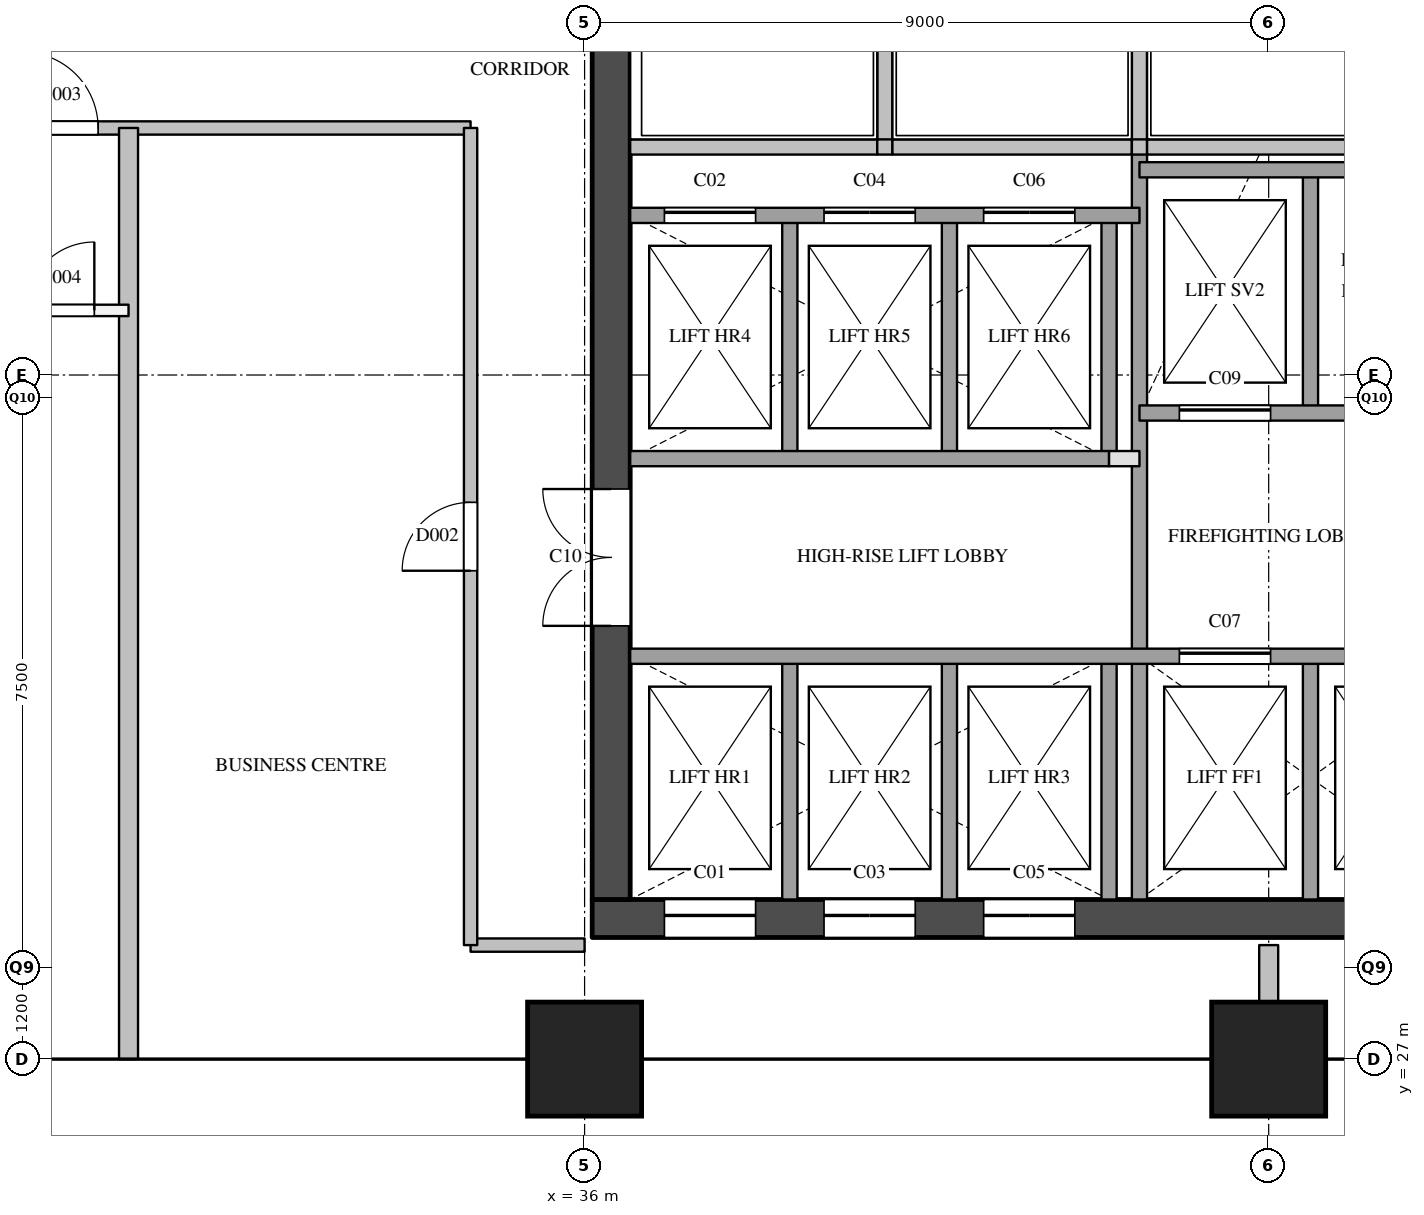
"""IFC4 building model, lengths in metres.
Left out: names, types, materials, properties, quantities, classifications, styles, units other than length and angle.
Written with IfcOpenShell. Run it as: python <this file> out.ifc"""

import sys

from ifc_helpers import new_model, si_unit, direction, frame, frame_2d, origin, origin_2d, place, context, subcontext, project, spatial, rectangle, extrude, element, fill, save


model = new_model("IFC4")
c1 = context("Model", 3, precision=1e-05, world=origin(), true_north=direction((0.0, 1.0)))
c2 = subcontext(c1, "Body", "Model", "MODEL_VIEW")
j1 = project(units=[si_unit("LENGTHUNIT", "METRE"), si_unit("PLANEANGLEUNIT", "RADIAN")], contexts=[c1])
p1 = place(None, origin())
s1 = spatial("IfcSite", under=j1, at=p1, CompositionType="ELEMENT")
p2 = place(p1, origin())
s2 = spatial("IfcBuilding", under=s1, at=p2, CompositionType="ELEMENT")
p3 = place(p2, frame((0.0, 0.0, 134.9)))
s3 = spatial("IfcBuildingStorey", under=s2, at=p3, CompositionType="ELEMENT", Elevation=134.9)
for number, where, z_axis, x_axis in (
    (1, (36.0, 27.0, 0.0), (0.0, 0.0, 1.0), (1.0, 0.0, 0.0)),
    (2, (45.0, 27.0, 0.0), (0.0, 0.0, 1.0), (1.0, 0.0, 0.0)),
):
    element("IfcColumn", number, at=place(p3, frame(where, z_axis=z_axis, x_axis=x_axis)), inside=s3, PredefinedType="COLUMN", context=c2, shape_type="SweptSolid", body=[
        extrude(rectangle(XDim=1.5, YDim=1.5, at=origin_2d()), origin(), (0.0, 0.0, 1.0), 3.9),
    ])
p4 = place(p3, frame((36.1, 28.85, 0.0), z_axis=(0.0, 0.0, 1.0), x_axis=(1.0, 0.0, 0.0)))
e3 = element("IfcWall", 3, at=p4, inside=s3, PredefinedType="SHEAR", context=c2, shape_type="SweptSolid", body=[
    extrude(rectangle(XDim=12.2, YDim=0.5, at=frame_2d((6.1, 0.0))), origin(), (0.0, 0.0, 1.0), 3.6),
])
p5 = place(p4, frame((0.95, 0.0, 0.0)))
e4 = element("IfcOpeningElement", 4, at=p5, cuts=e3, PredefinedType="OPENING", context=c2, shape_type="SweptSolid", body=[
    extrude(rectangle(XDim=1.2, YDim=2.1, at=frame_2d((0.6, 1.05))), frame((0.0, 0.26, 0.0), z_axis=(0.0, -1.0, 0.0), x_axis=(1.0, 0.0, 0.0)), (0.0, 0.0, 1.0), 0.52),
])
p6 = place(p4, frame((3.05, 0.0, 0.0)))
e5 = element("IfcOpeningElement", 5, at=p6, cuts=e3, PredefinedType="OPENING", context=c2, shape_type="SweptSolid", body=[
    extrude(rectangle(XDim=1.2, YDim=2.1, at=frame_2d((0.6, 1.05))), frame((0.0, 0.26, 0.0), z_axis=(0.0, -1.0, 0.0), x_axis=(1.0, 0.0, 0.0)), (0.0, 0.0, 1.0), 0.52),
])
p7 = place(p4, frame((5.15, 0.0, 0.0)))
e6 = element("IfcOpeningElement", 6, at=p7, cuts=e3, PredefinedType="OPENING", context=c2, shape_type="SweptSolid", body=[
    extrude(rectangle(XDim=1.2, YDim=2.1, at=frame_2d((0.6, 1.05))), frame((0.0, 0.26, 0.0), z_axis=(0.0, -1.0, 0.0), x_axis=(1.0, 0.0, 0.0)), (0.0, 0.0, 1.0), 0.52),
])
p8 = place(p3, frame((36.35, 29.1, 0.0), z_axis=(0.0, 0.0, 1.0), x_axis=(0.0, 1.0, 0.0)))
e7 = element("IfcWall", 7, at=p8, inside=s3, PredefinedType="SHEAR", context=c2, shape_type="SweptSolid", body=[
    extrude(rectangle(XDim=20.3, YDim=0.5, at=frame_2d((10.15, 0.0))), origin(), (0.0, 0.0, 1.0), 3.6),
])
p9 = place(p8, frame((3.6, 0.0, 0.0)))
e8 = element("IfcOpeningElement", 8, at=p9, cuts=e7, PredefinedType="OPENING", context=c2, shape_type="SweptSolid", body=[
    extrude(rectangle(XDim=1.8, YDim=2.1, at=frame_2d((0.9, 1.05))), frame((0.0, 0.26, 0.0), z_axis=(0.0, -1.0, 0.0), x_axis=(1.0, 0.0, 0.0)), (0.0, 0.0, 1.0), 0.52),
])
p10 = place(p8, frame((16.4, 0.0, 0.0)))
e9 = element("IfcOpeningElement", 9, at=p10, cuts=e7, PredefinedType="OPENING", context=c2, shape_type="SweptSolid", body=[
    extrude(rectangle(XDim=1.0, YDim=2.1, at=frame_2d((0.5, 1.05))), frame((0.0, 0.26, 0.0), z_axis=(0.0, -1.0, 0.0), x_axis=(1.0, 0.0, 0.0)), (0.0, 0.0, 1.0), 0.52),
])
p11 = place(p3, frame((38.7, 29.1, 0.0), z_axis=(0.0, 0.0, 1.0), x_axis=(0.0, 1.0, 0.0)))
e10 = element("IfcWall", 10, at=p11, inside=s3, PredefinedType="SOLIDWALL", context=c2, shape_type="SweptSolid", body=[
    extrude(rectangle(XDim=3.2, YDim=0.2, at=frame_2d((1.6, 0.0))), origin(), (0.0, 0.0, 1.0), 3.6),
])
p12 = place(p3, frame((38.7, 34.9, 0.0), z_axis=(0.0, 0.0, 1.0), x_axis=(0.0, 1.0, 0.0)))
e11 = element("IfcWall", 11, at=p12, inside=s3, PredefinedType="SOLIDWALL", context=c2, shape_type="SweptSolid", body=[
    extrude(rectangle(XDim=3.2, YDim=0.2, at=frame_2d((1.6, 0.0))), origin(), (0.0, 0.0, 1.0), 3.6),
])
p13 = place(p3, frame((39.95, 39.0, 0.0), z_axis=(0.0, 0.0, 1.0), x_axis=(0.0, 1.0, 0.0)))
e12 = element("IfcWall", 12, at=p13, inside=s3, PredefinedType="SOLIDWALL", context=c2, shape_type="SweptSolid", body=[
    extrude(rectangle(XDim=1.78, YDim=0.2, at=frame_2d((0.89, 0.0))), origin(), (0.0, 0.0, 1.0), 3.6),
])
p14 = place(p3, frame((40.8, 29.1, 0.0), z_axis=(0.0, 0.0, 1.0), x_axis=(0.0, 1.0, 0.0)))
e13 = element("IfcWall", 13, at=p14, inside=s3, PredefinedType="SOLIDWALL", context=c2, shape_type="SweptSolid", body=[
    extrude(rectangle(XDim=3.2, YDim=0.2, at=frame_2d((1.6, 0.0))), origin(), (0.0, 0.0, 1.0), 3.6),
])
p15 = place(p3, frame((40.8, 34.9, 0.0), z_axis=(0.0, 0.0, 1.0), x_axis=(0.0, 1.0, 0.0)))
e14 = element("IfcWall", 14, at=p15, inside=s3, PredefinedType="SOLIDWALL", context=c2, shape_type="SweptSolid", body=[
    extrude(rectangle(XDim=3.2, YDim=0.2, at=frame_2d((1.6, 0.0))), origin(), (0.0, 0.0, 1.0), 3.6),
])
p16 = place(p3, frame((42.9, 29.1, 0.0), z_axis=(0.0, 0.0, 1.0), x_axis=(0.0, 1.0, 0.0)))
e15 = element("IfcWall", 15, at=p16, inside=s3, PredefinedType="SOLIDWALL", context=c2, shape_type="SweptSolid", body=[
    extrude(rectangle(XDim=3.2, YDim=0.2, at=frame_2d((1.6, 0.0))), origin(), (0.0, 0.0, 1.0), 3.6),
])
p17 = place(p3, frame((42.9, 34.9, 0.0), z_axis=(0.0, 0.0, 1.0), x_axis=(0.0, 1.0, 0.0)))
e16 = element("IfcWall", 16, at=p17, inside=s3, PredefinedType="SOLIDWALL", context=c2, shape_type="SweptSolid", body=[
    extrude(rectangle(XDim=3.2, YDim=0.2, at=frame_2d((1.6, 0.0))), origin(), (0.0, 0.0, 1.0), 3.6),
])
p18 = place(p3, frame((43.3, 29.1, 0.0), z_axis=(0.0, 0.0, 1.0), x_axis=(0.0, 1.0, 0.0)))
e17 = element("IfcWall", 17, at=p18, inside=s3, PredefinedType="SOLIDWALL", context=c2, shape_type="SweptSolid", body=[
    extrude(rectangle(XDim=9.9, YDim=0.2, at=frame_2d((4.95, 0.0))), origin(), (0.0, 0.0, 1.0), 3.6),
])
p19 = place(p3, frame((43.3, 39.0, 0.0), z_axis=(0.0, 0.0, 1.0), x_axis=(0.0, 1.0, 0.0)))
e18 = element("IfcWall", 18, at=p19, inside=s3, PredefinedType="SOLIDWALL", context=c2, shape_type="SweptSolid", body=[
    extrude(rectangle(XDim=1.78, YDim=0.2, at=frame_2d((0.89, 0.0))), origin(), (0.0, 0.0, 1.0), 3.6),
])
for number, where, z_axis, x_axis in (
    (19, (45.55, 29.1, 0.0), (0.0, 0.0, 1.0), (0.0, 1.0, 0.0)),
    (20, (45.55, 35.5, 0.0), (0.0, 0.0, 1.0), (0.0, 1.0, 0.0)),
):
    element("IfcWall", number, at=place(p3, frame(where, z_axis=z_axis, x_axis=x_axis)), inside=s3, PredefinedType="SOLIDWALL", context=c2, shape_type="SweptSolid", body=[
        extrude(rectangle(XDim=3.2, YDim=0.2, at=frame_2d((1.6, 0.0))), origin(), (0.0, 0.0, 1.0), 3.6),
    ])
p20 = place(p3, frame((36.6, 32.3, 0.0), z_axis=(0.0, 0.0, 1.0), x_axis=(1.0, 0.0, 0.0)))
e21 = element("IfcWall", 21, at=p20, inside=s3, PredefinedType="SOLIDWALL", context=c2, shape_type="SweptSolid", body=[
    extrude(rectangle(XDim=11.2, YDim=0.2, at=frame_2d((5.6, 0.0))), origin(), (0.0, 0.0, 1.0), 3.6),
])
p21 = place(p20, frame((7.225, 0.0, 0.0)))
e22 = element("IfcOpeningElement", 22, at=p21, cuts=e21, PredefinedType="OPENING", context=c2, shape_type="SweptSolid", body=[
    extrude(rectangle(XDim=1.2, YDim=2.1, at=frame_2d((0.6, 1.05))), frame((0.0, 0.11, 0.0), z_axis=(0.0, -1.0, 0.0), x_axis=(1.0, 0.0, 0.0)), (0.0, 0.0, 1.0), 0.22),
])
p22 = place(p20, frame((9.475, 0.0, 0.0)))
e23 = element("IfcOpeningElement", 23, at=p22, cuts=e21, PredefinedType="OPENING", context=c2, shape_type="SweptSolid", body=[
    extrude(rectangle(XDim=1.2, YDim=2.1, at=frame_2d((0.6, 1.05))), frame((0.0, 0.11, 0.0), z_axis=(0.0, -1.0, 0.0), x_axis=(1.0, 0.0, 0.0)), (0.0, 0.0, 1.0), 0.22),
])
p23 = place(p3, frame((42.9, 34.9, 0.0), z_axis=(0.0, 0.0, 1.0), x_axis=(1.0, 0.0, 0.0)))
e24 = element("IfcWall", 24, at=p23, inside=s3, PredefinedType="PARTITIONING", context=c2, shape_type="SweptSolid", body=[
    extrude(rectangle(XDim=0.4, YDim=0.2, at=frame_2d((0.2, 0.0))), origin(), (0.0, 0.0, 1.0), 3.6),
])
p24 = place(p3, frame((36.6, 34.9, 0.0), z_axis=(0.0, 0.0, 1.0), x_axis=(1.0, 0.0, 0.0)))
e25 = element("IfcWall", 25, at=p24, inside=s3, PredefinedType="SOLIDWALL", context=c2, shape_type="SweptSolid", body=[
    extrude(rectangle(XDim=6.3, YDim=0.2, at=frame_2d((3.15, 0.0))), origin(), (0.0, 0.0, 1.0), 3.6),
])
p25 = place(p3, frame((43.3, 35.5, 0.0), z_axis=(0.0, 0.0, 1.0), x_axis=(1.0, 0.0, 0.0)))
e26 = element("IfcWall", 26, at=p25, inside=s3, PredefinedType="SOLIDWALL", context=c2, shape_type="SweptSolid", body=[
    extrude(rectangle(XDim=4.5, YDim=0.2, at=frame_2d((2.25, 0.0))), origin(), (0.0, 0.0, 1.0), 3.6),
])
p26 = place(p25, frame((0.525, 0.0, 0.0)))
e27 = element("IfcOpeningElement", 27, at=p26, cuts=e26, PredefinedType="OPENING", context=c2, shape_type="SweptSolid", body=[
    extrude(rectangle(XDim=1.2, YDim=2.1, at=frame_2d((0.6, 1.05))), frame((0.0, 0.11, 0.0), z_axis=(0.0, -1.0, 0.0), x_axis=(1.0, 0.0, 0.0)), (0.0, 0.0, 1.0), 0.22),
])
p27 = place(p25, frame((3.025, 0.0, 0.0)))
e28 = element("IfcOpeningElement", 28, at=p27, cuts=e26, PredefinedType="OPENING", context=c2, shape_type="SweptSolid", body=[
    extrude(rectangle(XDim=0.7, YDim=2.1, at=frame_2d((0.35, 1.05))), frame((0.0, 0.11, 0.0), z_axis=(0.0, -1.0, 0.0), x_axis=(1.0, 0.0, 0.0)), (0.0, 0.0, 1.0), 0.22),
])
p28 = place(p3, frame((36.6, 38.1, 0.0), z_axis=(0.0, 0.0, 1.0), x_axis=(1.0, 0.0, 0.0)))
e29 = element("IfcWall", 29, at=p28, inside=s3, PredefinedType="SOLIDWALL", context=c2, shape_type="SweptSolid", body=[
    extrude(rectangle(XDim=6.7, YDim=0.2, at=frame_2d((3.35, 0.0))), origin(), (0.0, 0.0, 1.0), 3.6),
])
p29 = place(p28, frame((0.45, 0.0, 0.0)))
e30 = element("IfcOpeningElement", 30, at=p29, cuts=e29, PredefinedType="OPENING", context=c2, shape_type="SweptSolid", body=[
    extrude(rectangle(XDim=1.2, YDim=2.1, at=frame_2d((0.6, 1.05))), frame((0.0, 0.11, 0.0), z_axis=(0.0, -1.0, 0.0), x_axis=(1.0, 0.0, 0.0)), (0.0, 0.0, 1.0), 0.22),
])
p30 = place(p28, frame((2.55, 0.0, 0.0)))
e31 = element("IfcOpeningElement", 31, at=p30, cuts=e29, PredefinedType="OPENING", context=c2, shape_type="SweptSolid", body=[
    extrude(rectangle(XDim=1.2, YDim=2.1, at=frame_2d((0.6, 1.05))), frame((0.0, 0.11, 0.0), z_axis=(0.0, -1.0, 0.0), x_axis=(1.0, 0.0, 0.0)), (0.0, 0.0, 1.0), 0.22),
])
p31 = place(p28, frame((4.65, 0.0, 0.0)))
e32 = element("IfcOpeningElement", 32, at=p31, cuts=e29, PredefinedType="OPENING", context=c2, shape_type="SweptSolid", body=[
    extrude(rectangle(XDim=1.2, YDim=2.1, at=frame_2d((0.6, 1.05))), frame((0.0, 0.11, 0.0), z_axis=(0.0, -1.0, 0.0), x_axis=(1.0, 0.0, 0.0)), (0.0, 0.0, 1.0), 0.22),
])
p32 = place(p3, frame((43.3, 38.7, 0.0), z_axis=(0.0, 0.0, 1.0), x_axis=(1.0, 0.0, 0.0)))
e33 = element("IfcWall", 33, at=p32, inside=s3, PredefinedType="SOLIDWALL", context=c2, shape_type="SweptSolid", body=[
    extrude(rectangle(XDim=4.5, YDim=0.2, at=frame_2d((2.25, 0.0))), origin(), (0.0, 0.0, 1.0), 3.6),
])
p33 = place(p3, frame((36.6, 39.0, 0.0), z_axis=(0.0, 0.0, 1.0), x_axis=(1.0, 0.0, 0.0)))
e34 = element("IfcWall", 34, at=p33, inside=s3, PredefinedType="SOLIDWALL", context=c2, shape_type="SweptSolid", body=[
    extrude(rectangle(XDim=3.25, YDim=0.2, at=frame_2d((1.625, 0.0))), origin(), (0.0, 0.0, 1.0), 3.6),
])
p34 = place(p3, frame((39.85, 39.0, 0.0), z_axis=(0.0, 0.0, 1.0), x_axis=(1.0, 0.0, 0.0)))
e35 = element("IfcWall", 35, at=p34, inside=s3, PredefinedType="SOLIDWALL", context=c2, shape_type="SweptSolid", body=[
    extrude(rectangle(XDim=0.2, YDim=0.2, at=frame_2d((0.1, 0.0))), origin(), (0.0, 0.0, 1.0), 3.6),
])
p35 = place(p3, frame((40.05, 39.0, 0.0), z_axis=(0.0, 0.0, 1.0), x_axis=(1.0, 0.0, 0.0)))
e36 = element("IfcWall", 36, at=p35, inside=s3, PredefinedType="SOLIDWALL", context=c2, shape_type="SweptSolid", body=[
    extrude(rectangle(XDim=3.15, YDim=0.2, at=frame_2d((1.575, 0.0))), origin(), (0.0, 0.0, 1.0), 3.6),
])
p36 = place(p3, frame((43.2, 39.0, 0.0), z_axis=(0.0, 0.0, 1.0), x_axis=(1.0, 0.0, 0.0)))
e37 = element("IfcWall", 37, at=p36, inside=s3, PredefinedType="SOLIDWALL", context=c2, shape_type="SweptSolid", body=[
    extrude(rectangle(XDim=0.2, YDim=0.2, at=frame_2d((0.1, 0.0))), origin(), (0.0, 0.0, 1.0), 3.6),
])
p37 = place(p3, frame((43.4, 39.0, 0.0), z_axis=(0.0, 0.0, 1.0), x_axis=(1.0, 0.0, 0.0)))
e38 = element("IfcWall", 38, at=p37, inside=s3, PredefinedType="SOLIDWALL", context=c2, shape_type="SweptSolid", body=[
    extrude(rectangle(XDim=3.25, YDim=0.2, at=frame_2d((1.625, 0.0))), origin(), (0.0, 0.0, 1.0), 3.6),
])
p38 = place(p3, frame((34.5, 28.5, 0.0), z_axis=(0.0, 0.0, 1.0), x_axis=(1.0, 0.0, 0.0)))
e39 = element("IfcWall", 39, at=p38, inside=s3, PredefinedType="PARTITIONING", context=c2, shape_type="SweptSolid", body=[
    extrude(rectangle(XDim=1.5, YDim=0.175, at=frame_2d((0.75, 0.0))), origin(), (0.0, 0.0, 1.0), 3.6),
])
p39 = place(p3, frame((19.5, 39.25, 0.0), z_axis=(0.0, 0.0, 1.0), x_axis=(1.0, 0.0, 0.0)))
e40 = element("IfcWall", 40, at=p39, inside=s3, PredefinedType="PARTITIONING", context=c2, shape_type="SweptSolid", body=[
    extrude(rectangle(XDim=15.0, YDim=0.175, at=frame_2d((7.5, 0.0))), origin(), (0.0, 0.0, 1.0), 2.6),
])
p40 = place(p39, frame((9.1, 0.0, 0.0)))
e41 = element("IfcOpeningElement", 41, at=p40, cuts=e40, PredefinedType="OPENING", context=c2, shape_type="SweptSolid", body=[
    extrude(rectangle(XDim=1.0, YDim=2.1, at=frame_2d((0.5, 1.05))), frame((0.0, 0.097, 0.0), z_axis=(0.0, -1.0, 0.0), x_axis=(1.0, 0.0, 0.0)), (0.0, 0.0, 1.0), 0.195),
])
p41 = place(p3, frame((34.5, 28.5, 0.0), z_axis=(0.0, 0.0, 1.0), x_axis=(0.0, 1.0, 0.0)))
e42 = element("IfcWall", 42, at=p41, inside=s3, PredefinedType="PARTITIONING", context=c2, shape_type="SweptSolid", body=[
    extrude(rectangle(XDim=10.75, YDim=0.175, at=frame_2d((5.375, 0.0))), origin(), (0.0, 0.0, 1.0), 3.6),
])
p42 = place(p41, frame((4.925, 0.0, 0.0)))
e43 = element("IfcOpeningElement", 43, at=p42, cuts=e42, PredefinedType="OPENING", context=c2, shape_type="SweptSolid", body=[
    extrude(rectangle(XDim=0.9, YDim=2.1, at=frame_2d((0.45, 1.05))), frame((0.0, 0.097, 0.0), z_axis=(0.0, -1.0, 0.0), x_axis=(1.0, 0.0, 0.0)), (0.0, 0.0, 1.0), 0.195),
])
p43 = place(p3, frame((28.2, 36.85, 0.0), z_axis=(0.0, 0.0, 1.0), x_axis=(1.0, 0.0, 0.0)))
e44 = element("IfcWall", 44, at=p43, inside=s3, PredefinedType="PARTITIONING", context=c2, shape_type="SweptSolid", body=[
    extrude(rectangle(XDim=1.8, YDim=0.15, at=frame_2d((0.9, 0.0))), origin(), (0.0, 0.0, 1.0), 3.6),
])
p44 = place(p43, frame((0.45, 0.0, 0.0)))
e45 = element("IfcOpeningElement", 45, at=p44, cuts=e44, PredefinedType="OPENING", context=c2, shape_type="SweptSolid", body=[
    extrude(rectangle(XDim=0.9, YDim=2.1, at=frame_2d((0.45, 1.05))), frame((0.0, 0.085, 0.0), z_axis=(0.0, -1.0, 0.0), x_axis=(1.0, 0.0, 0.0)), (0.0, 0.0, 1.0), 0.17),
])
p45 = place(p3, frame((30.0, 27.0, 0.0), z_axis=(0.0, 0.0, 1.0), x_axis=(0.0, 1.0, 0.0)))
e46 = element("IfcWall", 46, at=p45, inside=s3, PredefinedType="PARTITIONING", context=c2, shape_type="SweptSolid", body=[
    extrude(rectangle(XDim=12.25, YDim=0.25, at=frame_2d((6.125, 0.0))), origin(), (0.0, 0.0, 1.0), 2.6),
])
p46 = place(p3, frame((45.0, 27.0, 0.0), z_axis=(0.0, 0.0, 1.0), x_axis=(0.0, 1.0, 0.0)))
e47 = element("IfcWall", 47, at=p46, inside=s3, PredefinedType="PARTITIONING", context=c2, shape_type="SweptSolid", body=[
    extrude(rectangle(XDim=1.5, YDim=0.25, at=frame_2d((0.75, 0.0))), origin(), (0.0, 0.0, 1.0), 3.6),
])
p47 = place(p5, origin())
e48 = element("IfcDoor", 48, at=p47, inside=s3, OperationType="SLIDING_TO_LEFT", PredefinedType="DOOR", context=c2, shape_type="SweptSolid", body=[
    extrude(rectangle(XDim=1.2, YDim=2.1, at=frame_2d((0.6, 1.05))), frame((0.0, 0.025, 0.0), z_axis=(0.0, -1.0, 0.0), x_axis=(1.0, 0.0, 0.0)), (0.0, 0.0, 1.0), 0.05),
])
fill(e4, e48)
p48 = place(p29, origin())
e49 = element("IfcDoor", 49, at=p48, inside=s3, OperationType="SLIDING_TO_LEFT", PredefinedType="DOOR", context=c2, shape_type="SweptSolid", body=[
    extrude(rectangle(XDim=1.2, YDim=2.1, at=frame_2d((0.6, 1.05))), frame((0.0, 0.025, 0.0), z_axis=(0.0, -1.0, 0.0), x_axis=(1.0, 0.0, 0.0)), (0.0, 0.0, 1.0), 0.05),
])
fill(e30, e49)
p49 = place(p6, origin())
e50 = element("IfcDoor", 50, at=p49, inside=s3, OperationType="SLIDING_TO_LEFT", PredefinedType="DOOR", context=c2, shape_type="SweptSolid", body=[
    extrude(rectangle(XDim=1.2, YDim=2.1, at=frame_2d((0.6, 1.05))), frame((0.0, 0.025, 0.0), z_axis=(0.0, -1.0, 0.0), x_axis=(1.0, 0.0, 0.0)), (0.0, 0.0, 1.0), 0.05),
])
fill(e5, e50)
p50 = place(p30, origin())
e51 = element("IfcDoor", 51, at=p50, inside=s3, OperationType="SLIDING_TO_LEFT", PredefinedType="DOOR", context=c2, shape_type="SweptSolid", body=[
    extrude(rectangle(XDim=1.2, YDim=2.1, at=frame_2d((0.6, 1.05))), frame((0.0, 0.025, 0.0), z_axis=(0.0, -1.0, 0.0), x_axis=(1.0, 0.0, 0.0)), (0.0, 0.0, 1.0), 0.05),
])
fill(e31, e51)
p51 = place(p7, origin())
e52 = element("IfcDoor", 52, at=p51, inside=s3, OperationType="SLIDING_TO_LEFT", PredefinedType="DOOR", context=c2, shape_type="SweptSolid", body=[
    extrude(rectangle(XDim=1.2, YDim=2.1, at=frame_2d((0.6, 1.05))), frame((0.0, 0.025, 0.0), z_axis=(0.0, -1.0, 0.0), x_axis=(1.0, 0.0, 0.0)), (0.0, 0.0, 1.0), 0.05),
])
fill(e6, e52)
p52 = place(p31, origin())
e53 = element("IfcDoor", 53, at=p52, inside=s3, OperationType="SLIDING_TO_LEFT", PredefinedType="DOOR", context=c2, shape_type="SweptSolid", body=[
    extrude(rectangle(XDim=1.2, YDim=2.1, at=frame_2d((0.6, 1.05))), frame((0.0, 0.025, 0.0), z_axis=(0.0, -1.0, 0.0), x_axis=(1.0, 0.0, 0.0)), (0.0, 0.0, 1.0), 0.05),
])
fill(e32, e53)
p53 = place(p21, origin())
e54 = element("IfcDoor", 54, at=p53, inside=s3, OperationType="SLIDING_TO_LEFT", PredefinedType="DOOR", context=c2, shape_type="SweptSolid", body=[
    extrude(rectangle(XDim=1.2, YDim=2.1, at=frame_2d((0.6, 1.05))), frame((0.0, 0.025, 0.0), z_axis=(0.0, -1.0, 0.0), x_axis=(1.0, 0.0, 0.0)), (0.0, 0.0, 1.0), 0.05),
])
fill(e22, e54)
p54 = place(p26, origin())
e55 = element("IfcDoor", 55, at=p54, inside=s3, OperationType="SLIDING_TO_LEFT", PredefinedType="DOOR", context=c2, shape_type="SweptSolid", body=[
    extrude(rectangle(XDim=1.2, YDim=2.1, at=frame_2d((0.6, 1.05))), frame((0.0, 0.025, 0.0), z_axis=(0.0, -1.0, 0.0), x_axis=(1.0, 0.0, 0.0)), (0.0, 0.0, 1.0), 0.05),
])
fill(e27, e55)
p55 = place(p9, origin())
e56 = element("IfcDoor", 56, at=p55, inside=s3, OperationType="DOUBLE_DOOR_SINGLE_SWING", PredefinedType="DOOR", context=c2, shape_type="SweptSolid", body=[
    extrude(rectangle(XDim=1.8, YDim=2.1, at=frame_2d((0.9, 1.05))), frame((0.0, 0.025, 0.0), z_axis=(0.0, -1.0, 0.0), x_axis=(1.0, 0.0, 0.0)), (0.0, 0.0, 1.0), 0.05),
])
fill(e8, e56)
p56 = place(p42, origin())
e57 = element("IfcDoor", 57, at=p56, inside=s3, OperationType="SINGLE_SWING_LEFT", PredefinedType="DOOR", context=c2, shape_type="SweptSolid", body=[
    extrude(rectangle(XDim=0.9, YDim=2.1, at=frame_2d((0.45, 1.05))), frame((0.0, 0.025, 0.0), z_axis=(0.0, -1.0, 0.0), x_axis=(1.0, 0.0, 0.0)), (0.0, 0.0, 1.0), 0.05),
])
fill(e43, e57)
p57 = place(p40, origin())
e58 = element("IfcDoor", 58, at=p57, inside=s3, OperationType="SINGLE_SWING_LEFT", PredefinedType="DOOR", context=c2, shape_type="SweptSolid", body=[
    extrude(rectangle(XDim=1.0, YDim=2.1, at=frame_2d((0.5, 1.05))), frame((0.0, 0.025, 0.0), z_axis=(0.0, -1.0, 0.0), x_axis=(1.0, 0.0, 0.0)), (0.0, 0.0, 1.0), 0.05),
])
fill(e41, e58)
p58 = place(p44, origin())
e59 = element("IfcDoor", 59, at=p58, inside=s3, OperationType="SINGLE_SWING_RIGHT", PredefinedType="DOOR", context=c2, shape_type="SweptSolid", body=[
    extrude(rectangle(XDim=0.9, YDim=2.1, at=frame_2d((0.45, 1.05))), frame((0.0, 0.025, 0.0), z_axis=(0.0, -1.0, 0.0), x_axis=(1.0, 0.0, 0.0)), (0.0, 0.0, 1.0), 0.05),
])
fill(e45, e59)
save(model, sys.argv[1])
